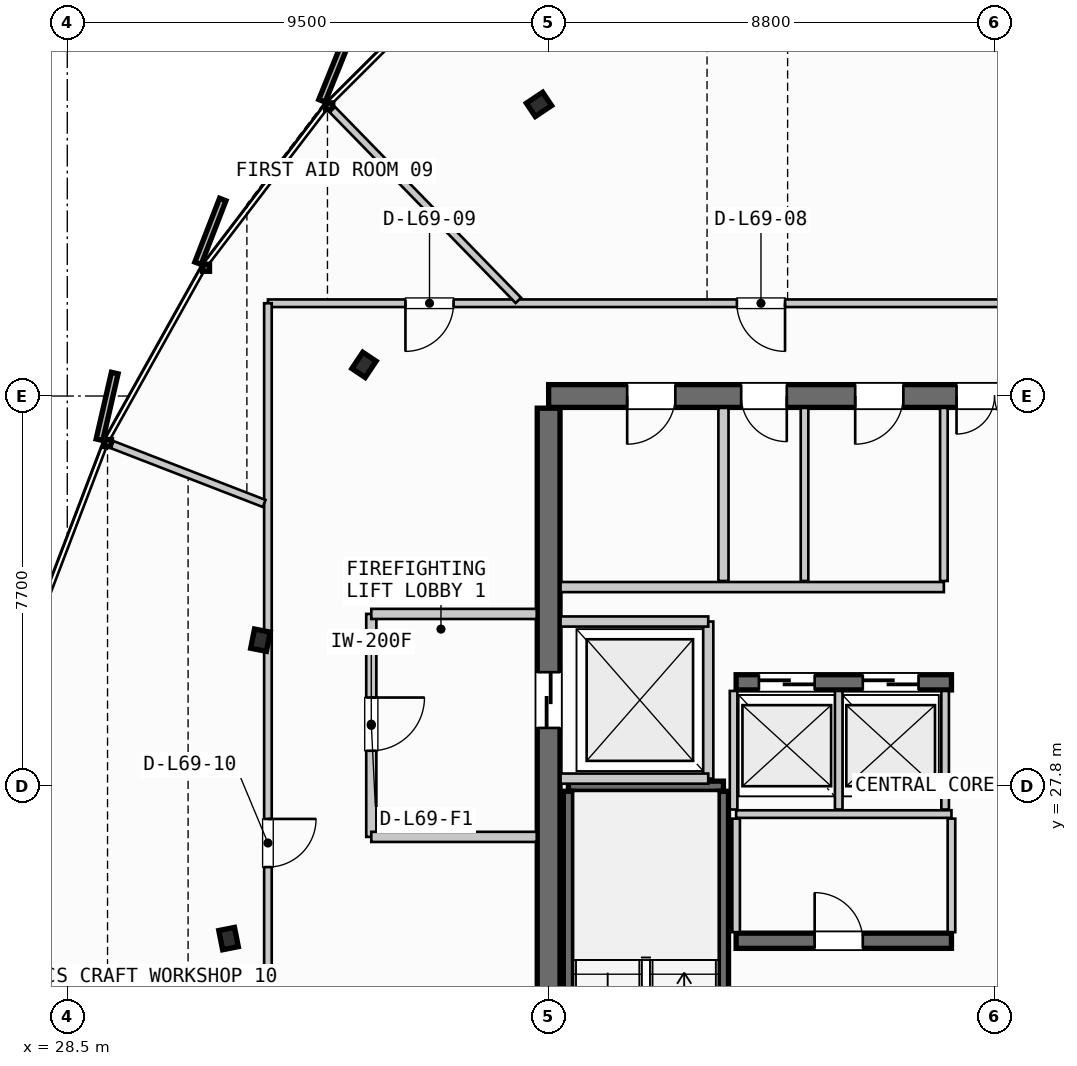
"""IFC4 building model, lengths in metres.
Left out: names, types, materials, properties, quantities, classifications, styles, units other than length and angle.
Written with IfcOpenShell. Run it as: python <this file> out.ifc"""

import sys

from ifc_helpers import new_model, si_unit, direction, frame, frame_2d, origin, origin_2d, place, context, subcontext, project, spatial, rectangle, i_section, extrude, source, transform, mapped, element, fill, save


model = new_model("IFC4")
c1 = context("Model", 3, precision=1e-05, world=origin(), true_north=direction((0.0, 1.0)))
c2 = subcontext(c1, "Body", "Model", "MODEL_VIEW")
j1 = project(units=[si_unit("LENGTHUNIT", "METRE"), si_unit("PLANEANGLEUNIT", "RADIAN")], contexts=[c1])
p1 = place(None, origin())
s1 = spatial("IfcSite", under=j1, at=p1, CompositionType="ELEMENT")
p2 = place(p1, origin())
s2 = spatial("IfcBuilding", under=s1, at=p2, CompositionType="ELEMENT")
p3 = place(p2, frame((0.0, 0.0, 262.9)))
s3 = spatial("IfcBuildingStorey", under=s2, at=p3, CompositionType="ELEMENT", Elevation=262.9)
p4 = place(p3, frame((55.6, 35.5, 0.0), z_axis=(0.0, 0.0, 1.0), x_axis=(-1.0, 0.0, 0.0)))
e1 = element("IfcWall", 1, at=p4, inside=s3, PredefinedType="SHEAR", context=c2, shape_type="SweptSolid", body=[
    extrude(rectangle(XDim=17.6, YDim=0.45, at=frame_2d((8.8, 0.0))), origin(), (0.0, 0.0, 1.0), 3.21),
])
p5 = place(p4, frame((8.05, 0.0, 0.0)))
e2 = element("IfcOpeningElement", 2, at=p5, cuts=e1, PredefinedType="OPENING", context=c2, shape_type="SweptSolid", body=[
    extrude(rectangle(XDim=1.5, YDim=2.2, at=frame_2d((0.75, 1.1))), frame((0.0, 0.235, 0.0), z_axis=(0.0, -1.0, 0.0), x_axis=(1.0, 0.0, 0.0)), (0.0, 0.0, 1.0), 0.47),
])
p6 = place(p4, frame((15.1, 0.0, 0.0)))
e3 = element("IfcOpeningElement", 3, at=p6, cuts=e1, PredefinedType="OPENING", context=c2, shape_type="SweptSolid", body=[
    extrude(rectangle(XDim=0.95, YDim=2.15, at=frame_2d((0.475, 1.075))), frame((0.0, 0.235, 0.0), z_axis=(0.0, -1.0, 0.0), x_axis=(1.0, 0.0, 0.0)), (0.0, 0.0, 1.0), 0.47),
])
p7 = place(p4, frame((12.9, 0.0, 0.0)))
e4 = element("IfcOpeningElement", 4, at=p7, cuts=e1, PredefinedType="OPENING", context=c2, shape_type="SweptSolid", body=[
    extrude(rectangle(XDim=0.9, YDim=2.15, at=frame_2d((0.45, 1.075))), frame((0.0, 0.235, 0.0), z_axis=(0.0, -1.0, 0.0), x_axis=(1.0, 0.0, 0.0)), (0.0, 0.0, 1.0), 0.47),
])
p8 = place(p4, frame((10.6, 0.0, 0.0)))
e5 = element("IfcOpeningElement", 5, at=p8, cuts=e1, PredefinedType="OPENING", context=c2, shape_type="SweptSolid", body=[
    extrude(rectangle(XDim=0.95, YDim=2.15, at=frame_2d((0.475, 1.075))), frame((0.0, 0.235, 0.0), z_axis=(0.0, -1.0, 0.0), x_axis=(1.0, 0.0, 0.0)), (0.0, 0.0, 1.0), 0.47),
])
p9 = place(p3, frame((38.0, 35.26, 0.0), z_axis=(0.0, 0.0, 1.0), x_axis=(0.0, -1.0, 0.0)))
e6 = element("IfcWall", 6, at=p9, inside=s3, PredefinedType="SHEAR", context=c2, shape_type="SweptSolid", body=[
    extrude(rectangle(XDim=14.92, YDim=0.45, at=frame_2d((7.46, 0.0))), origin(), (0.0, 0.0, 1.0), 3.21),
])
p10 = place(p9, frame((5.21, 0.0, 0.0)))
e7 = element("IfcOpeningElement", 7, at=p10, cuts=e6, PredefinedType="OPENING", context=c2, shape_type="SweptSolid", body=[
    extrude(rectangle(XDim=1.1, YDim=2.2, at=frame_2d((0.55, 1.1))), frame((0.0, 0.235, 0.0), z_axis=(0.0, -1.0, 0.0), x_axis=(1.0, 0.0, 0.0)), (0.0, 0.0, 1.0), 0.47),
])
p11 = place(p3, frame((41.7, 24.75, 0.0), z_axis=(0.0, 0.0, 1.0), x_axis=(1.0, 0.0, 0.0)))
e8 = element("IfcWall", 8, at=p11, inside=s3, PredefinedType="SHEAR", context=c2, shape_type="SweptSolid", body=[
    extrude(rectangle(XDim=4.25, YDim=0.3, at=frame_2d((2.125, 0.0))), origin(), (0.0, 0.0, 1.0), 3.21),
])
p12 = place(p11, frame((1.55, 0.0, 0.0)))
e9 = element("IfcOpeningElement", 9, at=p12, cuts=e8, PredefinedType="OPENING", context=c2, shape_type="SweptSolid", body=[
    extrude(rectangle(XDim=0.95, YDim=2.15, at=frame_2d((0.475, 1.075))), frame((0.0, 0.16, 0.0), z_axis=(0.0, -1.0, 0.0), x_axis=(1.0, 0.0, 0.0)), (0.0, 0.0, 1.0), 0.32),
])
p13 = place(p3, frame((41.7, 29.85, 0.0), z_axis=(0.0, 0.0, 1.0), x_axis=(1.0, 0.0, 0.0)))
e10 = element("IfcWall", 10, at=p13, inside=s3, PredefinedType="SHEAR", context=c2, shape_type="SweptSolid", body=[
    extrude(rectangle(XDim=4.25, YDim=0.3, at=frame_2d((2.125, 0.0))), origin(), (0.0, 0.0, 1.0), 3.21),
])
p14 = place(p13, frame((0.45, 0.0, 0.0)))
e11 = element("IfcOpeningElement", 11, at=p14, cuts=e10, PredefinedType="OPENING", context=c2, shape_type="SweptSolid", body=[
    extrude(rectangle(XDim=1.1, YDim=2.2, at=frame_2d((0.55, 1.1))), frame((0.0, 0.16, 0.0), z_axis=(0.0, -1.0, 0.0), x_axis=(1.0, 0.0, 0.0)), (0.0, 0.0, 1.0), 0.32),
])
p15 = place(p13, frame((2.5, 0.0, 0.0)))
e12 = element("IfcOpeningElement", 12, at=p15, cuts=e10, PredefinedType="OPENING", context=c2, shape_type="SweptSolid", body=[
    extrude(rectangle(XDim=1.1, YDim=2.2, at=frame_2d((0.55, 1.1))), frame((0.0, 0.16, 0.0), z_axis=(0.0, -1.0, 0.0), x_axis=(1.0, 0.0, 0.0)), (0.0, 0.0, 1.0), 0.32),
])
m1 = source(origin(), c2, "Body", "SweptSolid", [
    extrude(i_section(OverallWidth=0.387, OverallDepth=0.316, WebThickness=0.019, FlangeThickness=0.028, FilletRadius=0.015, at=origin_2d()), origin(), (0.0, 0.0, 1.0), 3.21),
])
for number, where, z_axis, x_axis in (
    (13, (37.81, 41.255, 0.0), (0.0, 0.0, 1.0), (-0.556, 0.831, 0.0)),
    (14, (34.356, 36.115, 0.0), (0.0, 0.0, 1.0), (-0.831, 0.556, 0.0)),
    (15, (32.312, 30.682, 0.0), (0.0, 0.0, 1.0), (-0.981, 0.195, 0.0)),
    (16, (31.683, 24.793, 0.0), (0.0, 0.0, 1.0), (-0.981, -0.195, 0.0)),
):
    element("IfcColumn", number, at=place(p3, frame(where, z_axis=z_axis, x_axis=x_axis)), inside=s3, PredefinedType="COLUMN", context=c2, shape_type="MappedRepresentation", body=[
        mapped(m1, transform((0.0, 0.0, 0.0), scale=1.0)),
    ])
p16 = place(p3, frame((38.39, 27.8, 0.0), z_axis=(0.0, 0.0, 1.0), x_axis=(1.0, 0.0, 0.0)))
e17 = element("IfcWall", 17, at=p16, inside=s3, PredefinedType="SHEAR", context=c2, shape_type="SweptSolid", body=[
    extrude(rectangle(XDim=3.06, YDim=0.2, at=frame_2d((1.53, 0.0))), origin(), (0.0, 0.0, 1.0), 3.21),
])
for number, where, z_axis, x_axis in (
    (18, (41.45, 27.7, 0.0), (0.0, 0.0, 1.0), (0.0, -1.0, 0.0)),
    (19, (38.39, 20.35, 0.0), (0.0, 0.0, 1.0), (0.0, 1.0, 0.0)),
):
    element("IfcWall", number, at=place(p3, frame(where, z_axis=z_axis, x_axis=x_axis)), inside=s3, PredefinedType="SHEAR", context=c2, shape_type="SweptSolid", body=[
        extrude(rectangle(XDim=7.35, YDim=0.2, at=frame_2d((3.675, 0.0))), origin(), (0.0, 0.0, 1.0), 3.21),
    ])
p17 = place(p3, frame((41.15, 27.95, 0.0), z_axis=(0.0, 0.0, 1.0), x_axis=(0.0, 1.0, 0.0)))
e20 = element("IfcWall", 20, at=p17, inside=s3, PredefinedType="PARTITIONING", context=c2, shape_type="SweptSolid", body=[
    extrude(rectangle(XDim=3.1, YDim=0.2, at=frame_2d((1.55, 0.0))), origin(), (0.0, 0.0, 1.0), 2.735),
])
for number, where, z_axis, x_axis in (
    (21, (38.235, 27.95, 0.0), (0.0, 0.0, 1.0), (1.0, 0.0, 0.0)),
    (22, (38.235, 31.05, 0.0), (0.0, 0.0, 1.0), (1.0, 0.0, 0.0)),
):
    element("IfcWall", number, at=place(p3, frame(where, z_axis=z_axis, x_axis=x_axis)), inside=s3, PredefinedType="PARTITIONING", context=c2, shape_type="SweptSolid", body=[
        extrude(rectangle(XDim=2.915, YDim=0.2, at=frame_2d((1.458, 0.0))), origin(), (0.0, 0.0, 1.0), 2.735),
    ])
p18 = place(p3, frame((34.5, 31.2, 0.0), z_axis=(0.0, 0.0, 1.0), x_axis=(0.0, -1.0, 0.0)))
e23 = element("IfcWall", 23, at=p18, inside=s3, PredefinedType="PARTITIONING", context=c2, shape_type="SweptSolid", body=[
    extrude(rectangle(XDim=4.4, YDim=0.2, at=frame_2d((2.2, 0.0))), origin(), (0.0, 0.0, 1.0), 2.735),
])
p19 = place(p18, frame((1.65, 0.0, 0.0)))
e24 = element("IfcOpeningElement", 24, at=p19, cuts=e23, PredefinedType="OPENING", context=c2, shape_type="SweptSolid", body=[
    extrude(rectangle(XDim=1.05, YDim=2.15, at=frame_2d((0.525, 1.075))), frame((0.0, 0.11, 0.0), z_axis=(0.0, -1.0, 0.0), x_axis=(1.0, 0.0, 0.0)), (0.0, 0.0, 1.0), 0.22),
])
for number, where, z_axis, x_axis in (
    (25, (34.5, 26.8, 0.0), (0.0, 0.0, 1.0), (1.0, 0.0, 0.0)),
    (26, (34.5, 31.2, 0.0), (0.0, 0.0, 1.0), (1.0, 0.0, 0.0)),
):
    element("IfcWall", number, at=place(p3, frame(where, z_axis=z_axis, x_axis=x_axis)), inside=s3, PredefinedType="PARTITIONING", context=c2, shape_type="SweptSolid", body=[
        extrude(rectangle(XDim=3.265, YDim=0.2, at=frame_2d((1.632, 0.0))), origin(), (0.0, 0.0, 1.0), 2.735),
    ])
p20 = place(p3, frame((41.7, 27.25, 0.0), z_axis=(0.0, 0.0, 1.0), x_axis=(1.0, 0.0, 0.0)))
e27 = element("IfcWall", 27, at=p20, inside=s3, PredefinedType="PARTITIONING", context=c2, shape_type="SweptSolid", body=[
    extrude(rectangle(XDim=4.25, YDim=0.15, at=frame_2d((2.125, 0.0))), origin(), (0.0, 0.0, 1.0), 2.735),
])
for number, where, z_axis, x_axis in (
    (28, (41.7, 24.92, 0.0), (0.0, 0.0, 1.0), (0.0, 1.0, 0.0)),
    (29, (45.95, 24.92, 0.0), (0.0, 0.0, 1.0), (0.0, 1.0, 0.0)),
):
    element("IfcWall", number, at=place(p3, frame(where, z_axis=z_axis, x_axis=x_axis)), inside=s3, PredefinedType="PARTITIONING", context=c2, shape_type="SweptSolid", body=[
        extrude(rectangle(XDim=2.24, YDim=0.15, at=frame_2d((1.12, 0.0))), origin(), (0.0, 0.0, 1.0), 2.735),
    ])
for number, where, z_axis, x_axis in (
    (30, (41.65, 27.34, 0.0), (0.0, 0.0, 1.0), (0.0, 1.0, 0.0)),
    (31, (43.725, 27.34, 0.0), (0.0, 0.0, 1.0), (0.0, 1.0, 0.0)),
    (32, (45.825, 27.34, 0.0), (0.0, 0.0, 1.0), (0.0, 1.0, 0.0)),
):
    element("IfcWall", number, at=place(p3, frame(where, z_axis=z_axis, x_axis=x_axis)), inside=s3, PredefinedType="PARTITIONING", context=c2, shape_type="SweptSolid", body=[
        extrude(rectangle(XDim=2.34, YDim=0.15, at=frame_2d((1.17, 0.0))), origin(), (0.0, 0.0, 1.0), 2.735),
    ])
p21 = place(p3, frame((41.45, 31.85, 0.0), z_axis=(0.0, 0.0, 1.0), x_axis=(0.0, 1.0, 0.0)))
e33 = element("IfcWall", 33, at=p21, inside=s3, PredefinedType="PARTITIONING", context=c2, shape_type="SweptSolid", body=[
    extrude(rectangle(XDim=3.415, YDim=0.2, at=frame_2d((1.708, 0.0))), origin(), (0.0, 0.0, 1.0), 2.735),
])
p22 = place(p3, frame((38.235, 31.73, 0.0), z_axis=(0.0, 0.0, 1.0), x_axis=(1.0, 0.0, 0.0)))
e34 = element("IfcWall", 34, at=p22, inside=s3, PredefinedType="PARTITIONING", context=c2, shape_type="SweptSolid", body=[
    extrude(rectangle(XDim=7.565, YDim=0.2, at=frame_2d((3.782, 0.0))), origin(), (0.0, 0.0, 1.0), 2.735),
])
p23 = place(p3, frame((45.8, 31.85, 0.0), z_axis=(0.0, 0.0, 1.0), x_axis=(0.0, 1.0, 0.0)))
e35 = element("IfcWall", 35, at=p23, inside=s3, PredefinedType="PARTITIONING", context=c2, shape_type="SweptSolid", body=[
    extrude(rectangle(XDim=3.415, YDim=0.15, at=frame_2d((1.708, 0.0))), origin(), (0.0, 0.0, 1.0), 2.735),
])
p24 = place(p3, frame((43.05, 31.85, 0.0), z_axis=(0.0, 0.0, 1.0), x_axis=(0.0, 1.0, 0.0)))
e36 = element("IfcWall", 36, at=p24, inside=s3, PredefinedType="PLUMBINGWALL", context=c2, shape_type="SweptSolid", body=[
    extrude(rectangle(XDim=3.415, YDim=0.15, at=frame_2d((1.708, 0.0))), origin(), (0.0, 0.0, 1.0), 2.735),
])
p25 = place(p3, frame((61.902, 37.331, 0.0), z_axis=(0.0, 0.0, 1.0), x_axis=(-1.0, 0.0, 0.0)))
e37 = element("IfcWall", 37, at=p25, inside=s3, PredefinedType="PARTITIONING", context=c2, shape_type="SweptSolid", body=[
    extrude(rectangle(XDim=29.442, YDim=0.15, at=frame_2d((14.721, 0.0))), origin(), (0.0, 0.0, 1.0), 2.735),
])
p26 = place(p25, frame((5.025, 0.0, 0.0)))
e38 = element("IfcOpeningElement", 38, at=p26, cuts=e37, PredefinedType="OPENING", context=c2, shape_type="SweptSolid", body=[
    extrude(rectangle(XDim=0.95, YDim=2.15, at=frame_2d((0.475, 1.075))), frame((0.0, 0.085, 0.0), z_axis=(0.0, -1.0, 0.0), x_axis=(1.0, 0.0, 0.0)), (0.0, 0.0, 1.0), 0.17),
])
p27 = place(p25, frame((12.153, 0.0, 0.0)))
e39 = element("IfcOpeningElement", 39, at=p27, cuts=e37, PredefinedType="OPENING", context=c2, shape_type="SweptSolid", body=[
    extrude(rectangle(XDim=0.95, YDim=2.15, at=frame_2d((0.475, 1.075))), frame((0.0, 0.085, 0.0), z_axis=(0.0, -1.0, 0.0), x_axis=(1.0, 0.0, 0.0)), (0.0, 0.0, 1.0), 0.17),
])
p28 = place(p25, frame((19.237, 0.0, 0.0)))
e40 = element("IfcOpeningElement", 40, at=p28, cuts=e37, PredefinedType="OPENING", context=c2, shape_type="SweptSolid", body=[
    extrude(rectangle(XDim=0.95, YDim=2.15, at=frame_2d((0.475, 1.075))), frame((0.0, 0.085, 0.0), z_axis=(0.0, -1.0, 0.0), x_axis=(1.0, 0.0, 0.0)), (0.0, 0.0, 1.0), 0.17),
])
p29 = place(p25, frame((25.778, 0.0, 0.0)))
e41 = element("IfcOpeningElement", 41, at=p29, cuts=e37, PredefinedType="OPENING", context=c2, shape_type="SweptSolid", body=[
    extrude(rectangle(XDim=0.95, YDim=2.15, at=frame_2d((0.475, 1.075))), frame((0.0, 0.085, 0.0), z_axis=(0.0, -1.0, 0.0), x_axis=(1.0, 0.0, 0.0)), (0.0, 0.0, 1.0), 0.17),
])
p30 = place(p3, frame((32.46, 37.331, 0.0), z_axis=(0.0, 0.0, 1.0), x_axis=(0.0, -1.0, 0.0)))
e42 = element("IfcWall", 42, at=p30, inside=s3, PredefinedType="PARTITIONING", context=c2, shape_type="SweptSolid", body=[
    extrude(rectangle(XDim=19.524, YDim=0.15, at=frame_2d((9.762, 0.0))), origin(), (0.0, 0.0, 1.0), 2.735),
])
p31 = place(p30, frame((10.177, 0.0, 0.0)))
e43 = element("IfcOpeningElement", 43, at=p31, cuts=e42, PredefinedType="OPENING", context=c2, shape_type="SweptSolid", body=[
    extrude(rectangle(XDim=0.95, YDim=2.15, at=frame_2d((0.475, 1.075))), frame((0.0, 0.085, 0.0), z_axis=(0.0, -1.0, 0.0), x_axis=(1.0, 0.0, 0.0)), (0.0, 0.0, 1.0), 0.17),
])
p32 = place(p3, frame((37.402, 37.388, 0.0), z_axis=(0.0, 0.0, 1.0), x_axis=(-0.698109660125, 0.715990853601, 0.0)))
e44 = element("IfcWall", 44, at=p32, inside=s3, PredefinedType="PARTITIONING", context=c2, shape_type="SweptSolid", body=[
    extrude(rectangle(XDim=5.257, YDim=0.15, at=frame_2d((2.628, 0.0))), origin(), (0.0, 0.0, 1.0), 2.735),
])
p33 = place(p3, frame((32.385, 33.38, 0.0), z_axis=(0.0, 0.0, 1.0), x_axis=(-0.932530982882, 0.361089969349, 0.0)))
e45 = element("IfcWall", 45, at=p33, inside=s3, PredefinedType="PARTITIONING", context=c2, shape_type="SweptSolid", body=[
    extrude(rectangle(XDim=3.215, YDim=0.15, at=frame_2d((1.607, 0.0))), origin(), (0.0, 0.0, 1.0), 2.735),
])
m2 = source(origin(), c2, "Body", "SweptSolid", [
    extrude(rectangle(XDim=1.5, YDim=2.2, at=frame_2d((0.75, 1.1))), frame((0.0, 0.025, 0.0), z_axis=(0.0, -1.0, 0.0), x_axis=(1.0, 0.0, 0.0)), (0.0, 0.0, 1.0), 0.05),
])
p34 = place(p5, origin())
e46 = element("IfcDoor", 46, at=p34, inside=s3, OperationType="DOUBLE_DOOR_SINGLE_SWING", PredefinedType="DOOR", context=c2, shape_type="MappedRepresentation", body=[
    mapped(m2, transform((0.0, 0.0, 0.0), scale=1.0)),
])
fill(e2, e46)
m3 = source(origin(), c2, "Body", "SweptSolid", [
    extrude(rectangle(XDim=1.1, YDim=2.2, at=frame_2d((0.55, 1.1))), frame((0.0, 0.025, 0.0), z_axis=(0.0, -1.0, 0.0), x_axis=(1.0, 0.0, 0.0)), (0.0, 0.0, 1.0), 0.05),
])
p35 = place(p10, origin())
e47 = element("IfcDoor", 47, at=p35, inside=s3, OperationType="SLIDING_TO_LEFT", PredefinedType="DOOR", context=c2, shape_type="MappedRepresentation", body=[
    mapped(m3, transform((0.0, 0.0, 0.0), scale=1.0)),
])
fill(e7, e47)
m4 = source(origin(), c2, "Body", "SweptSolid", [
    extrude(rectangle(XDim=0.95, YDim=2.15, at=frame_2d((0.475, 1.075))), frame((0.0, 0.025, 0.0), z_axis=(0.0, -1.0, 0.0), x_axis=(1.0, 0.0, 0.0)), (0.0, 0.0, 1.0), 0.05),
])
p36 = place(p12, origin())
e48 = element("IfcDoor", 48, at=p36, inside=s3, OperationType="SINGLE_SWING_LEFT", PredefinedType="DOOR", context=c2, shape_type="MappedRepresentation", body=[
    mapped(m4, transform((0.0, 0.0, 0.0), scale=1.0)),
])
fill(e9, e48)
p37 = place(p14, origin())
e49 = element("IfcDoor", 49, at=p37, inside=s3, OperationType="SLIDING_TO_LEFT", PredefinedType="DOOR", context=c2, shape_type="MappedRepresentation", body=[
    mapped(m3, transform((0.0, 0.0, 0.0), scale=1.0)),
])
fill(e11, e49)
p38 = place(p15, origin())
e50 = element("IfcDoor", 50, at=p38, inside=s3, OperationType="SLIDING_TO_LEFT", PredefinedType="DOOR", context=c2, shape_type="MappedRepresentation", body=[
    mapped(m3, transform((0.0, 0.0, 0.0), scale=1.0)),
])
fill(e12, e50)
p39 = place(p6, origin())
e51 = element("IfcDoor", 51, at=p39, inside=s3, OperationType="SINGLE_SWING_RIGHT", PredefinedType="DOOR", context=c2, shape_type="MappedRepresentation", body=[
    mapped(m4, transform((0.0, 0.0, 0.0), scale=1.0)),
])
fill(e3, e51)
m5 = source(origin(), c2, "Body", "SweptSolid", [
    extrude(rectangle(XDim=0.9, YDim=2.15, at=frame_2d((0.45, 1.075))), frame((0.0, 0.025, 0.0), z_axis=(0.0, -1.0, 0.0), x_axis=(1.0, 0.0, 0.0)), (0.0, 0.0, 1.0), 0.05),
])
p40 = place(p7, origin())
e52 = element("IfcDoor", 52, at=p40, inside=s3, OperationType="SINGLE_SWING_LEFT", PredefinedType="DOOR", context=c2, shape_type="MappedRepresentation", body=[
    mapped(m5, transform((0.0, 0.0, 0.0), scale=1.0)),
])
fill(e4, e52)
p41 = place(p8, origin())
e53 = element("IfcDoor", 53, at=p41, inside=s3, OperationType="SINGLE_SWING_RIGHT", PredefinedType="DOOR", context=c2, shape_type="MappedRepresentation", body=[
    mapped(m4, transform((0.0, 0.0, 0.0), scale=1.0)),
])
fill(e5, e53)
m6 = source(origin(), c2, "Body", "SweptSolid", [
    extrude(rectangle(XDim=1.05, YDim=2.15, at=frame_2d((0.525, 1.075))), frame((0.0, 0.025, 0.0), z_axis=(0.0, -1.0, 0.0), x_axis=(1.0, 0.0, 0.0)), (0.0, 0.0, 1.0), 0.05),
])
p42 = place(p19, origin())
e54 = element("IfcDoor", 54, at=p42, inside=s3, OperationType="SINGLE_SWING_LEFT", PredefinedType="DOOR", context=c2, shape_type="MappedRepresentation", body=[
    mapped(m6, transform((0.0, 0.0, 0.0), scale=1.0)),
])
fill(e24, e54)
p43 = place(p28, origin())
e55 = element("IfcDoor", 55, at=p43, inside=s3, OperationType="SINGLE_SWING_LEFT", PredefinedType="DOOR", context=c2, shape_type="MappedRepresentation", body=[
    mapped(m4, transform((0.0, 0.0, 0.0), scale=1.0)),
])
fill(e40, e55)
p44 = place(p29, origin())
e56 = element("IfcDoor", 56, at=p44, inside=s3, OperationType="SINGLE_SWING_RIGHT", PredefinedType="DOOR", context=c2, shape_type="MappedRepresentation", body=[
    mapped(m4, transform((0.0, 0.0, 0.0), scale=1.0)),
])
fill(e41, e56)
p45 = place(p31, origin())
e57 = element("IfcDoor", 57, at=p45, inside=s3, OperationType="SINGLE_SWING_LEFT", PredefinedType="DOOR", context=c2, shape_type="MappedRepresentation", body=[
    mapped(m4, transform((0.0, 0.0, 0.0), scale=1.0)),
])
fill(e43, e57)
save(model, sys.argv[1])
